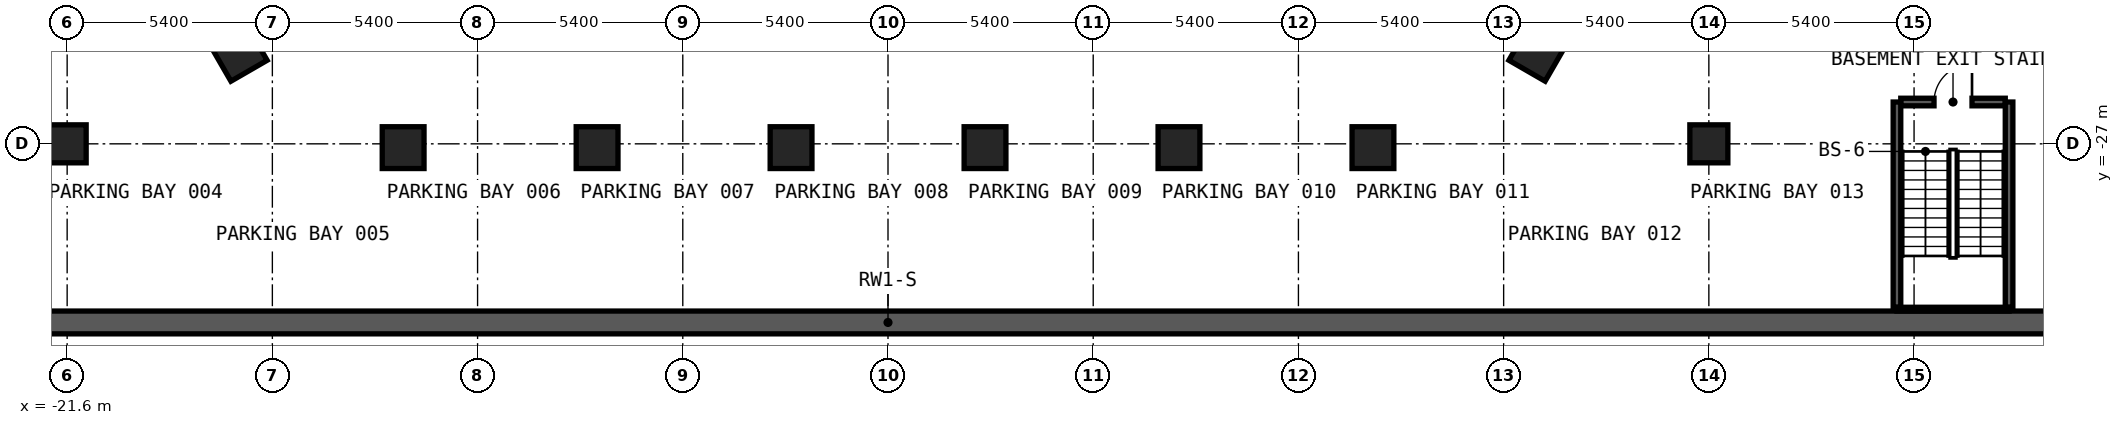
"""IFC4 building model, lengths in metres.
Left out: names, types, materials, properties, quantities, classifications, styles, units other than length and angle.
Written with IfcOpenShell. Run it as: python <this file> out.ifc"""

import sys

from ifc_helpers import new_model, si_unit, direction, frame, frame_2d, origin, origin_2d, place, context, subcontext, project, spatial, rectangle, extrude, element, fill, save


model = new_model("IFC4")
c1 = context("Model", 3, precision=1e-05, world=origin(), true_north=direction((0.0, 1.0)))
c2 = subcontext(c1, "Body", "Model", "MODEL_VIEW")
j1 = project(units=[si_unit("LENGTHUNIT", "METRE"), si_unit("PLANEANGLEUNIT", "RADIAN")], contexts=[c1])
p1 = place(None, origin())
s1 = spatial("IfcSite", under=j1, at=p1, CompositionType="ELEMENT")
p2 = place(p1, origin())
s2 = spatial("IfcBuilding", under=s1, at=p2, CompositionType="ELEMENT")
p3 = place(p2, frame((0.0, 0.0, -8.4)))
s3 = spatial("IfcBuildingStorey", under=s2, at=p3, CompositionType="ELEMENT", Elevation=-8.4)
p4 = place(p3, frame((-48.0, -31.7, -0.35), z_axis=(0.0, 0.0, 1.0), x_axis=(1.0, 0.0, 0.0)))
e1 = element("IfcWall", 1, at=p4, inside=s3, PredefinedType="SOLIDWALL", context=c2, shape_type="SweptSolid", body=[
    extrude(rectangle(XDim=96.0, YDim=0.6, at=frame_2d((48.0, 0.0))), origin(), (0.0, 0.0, 1.0), 4.55),
])
for number, where, z_axis, x_axis in (
    (2, (-17.089, -24.601, -0.35), (0.0, 0.0, 1.0), (0.5, -0.866, 0.0)),
    (3, (-12.759, -27.1, -0.35), (0.0, 0.0, 1.0), (1.0, 0.0, 0.0)),
    (4, (-7.655, -27.1, -0.35), (0.0, 0.0, 1.0), (1.0, 0.0, 0.0)),
    (5, (-2.551, -27.1, -0.35), (0.0, 0.0, 1.0), (1.0, 0.0, 0.0)),
    (6, (2.553, -27.1, -0.35), (0.0, 0.0, 1.0), (1.0, 0.0, 0.0)),
    (7, (7.657, -27.1, -0.35), (0.0, 0.0, 1.0), (1.0, 0.0, 0.0)),
    (8, (12.761, -27.1, -0.35), (0.0, 0.0, 1.0), (1.0, 0.0, 0.0)),
    (9, (17.09, -24.6, -0.35), (0.0, 0.0, 1.0), (0.5, 0.866, 0.0)),
):
    element("IfcColumn", number, at=place(p3, frame(where, z_axis=z_axis, x_axis=x_axis)), inside=s3, PredefinedType="COLUMN", context=c2, shape_type="SweptSolid", body=[
        extrude(rectangle(XDim=1.1, YDim=1.1, at=origin_2d()), origin(), (0.0, 0.0, 1.0), 4.55),
    ])
for number, where, z_axis, x_axis in (
    (10, (-21.6, -27.0, -0.35), (0.0, 0.0, 1.0), (1.0, 0.0, 0.0)),
    (11, (21.6, -27.0, -0.35), (0.0, 0.0, 1.0), (1.0, 0.0, 0.0)),
):
    element("IfcColumn", number, at=place(p3, frame(where, z_axis=z_axis, x_axis=x_axis)), inside=s3, PredefinedType="COLUMN", context=c2, shape_type="SweptSolid", body=[
        extrude(rectangle(XDim=1.0, YDim=1.0, at=origin_2d()), origin(), (0.0, 0.0, 1.0), 4.55),
    ])
p5 = place(p3, frame((26.65, -25.9, 0.0), z_axis=(0.0, 0.0, 1.0), x_axis=(1.0, 0.0, 0.0)))
e12 = element("IfcWall", 12, at=p5, inside=s3, PredefinedType="SOLIDWALL", context=c2, shape_type="SweptSolid", body=[
    extrude(rectangle(XDim=2.75, YDim=0.2, at=frame_2d((1.375, 0.0))), origin(), (0.0, 0.0, 1.0), 3.85),
])
p6 = place(p5, frame((1.875, 0.0, 0.0), z_axis=(0.0, 0.0, 1.0), x_axis=(-1.0, 0.0, 0.0)))
e13 = element("IfcOpeningElement", 13, at=p6, cuts=e12, PredefinedType="OPENING", context=c2, shape_type="SweptSolid", body=[
    extrude(rectangle(XDim=1.0, YDim=2.1, at=frame_2d((0.5, 1.05))), frame((0.0, 0.11, 0.0), z_axis=(0.0, -1.0, 0.0), x_axis=(1.0, 0.0, 0.0)), (0.0, 0.0, 1.0), 0.22),
])
for number, where, z_axis, x_axis in (
    (14, (26.55, -31.3, 0.0), (0.0, 0.0, 1.0), (0.0, 1.0, 0.0)),
    (15, (29.5, -31.3, 0.0), (0.0, 0.0, 1.0), (0.0, 1.0, 0.0)),
):
    element("IfcWall", number, at=place(p3, frame(where, z_axis=z_axis, x_axis=x_axis)), inside=s3, PredefinedType="SOLIDWALL", context=c2, shape_type="SweptSolid", body=[
        extrude(rectangle(XDim=5.4, YDim=0.2, at=frame_2d((2.7, 0.0))), origin(), (0.0, 0.0, 1.0), 3.85),
    ])
p7 = place(p3, frame((26.55, -31.35, 0.0), z_axis=(0.0, 0.0, 1.0), x_axis=(1.0, 0.0, 0.0)))
e16 = element("IfcWall", 16, at=p7, inside=s3, PredefinedType="SOLIDWALL", context=c2, shape_type="SweptSolid", body=[
    extrude(rectangle(XDim=2.95, YDim=0.1, at=frame_2d((1.475, 0.0))), origin(), (0.0, 0.0, 1.0), 3.85),
])
p8 = place(p6, origin())
e17 = element("IfcDoor", 17, at=p8, inside=s3, OperationType="SINGLE_SWING_LEFT", PredefinedType="DOOR", context=c2, shape_type="SweptSolid", body=[
    extrude(rectangle(XDim=1.0, YDim=2.1, at=frame_2d((0.5, 1.05))), frame((0.0, 0.025, 0.0), z_axis=(0.0, -1.0, 0.0), x_axis=(1.0, 0.0, 0.0)), (0.0, 0.0, 1.0), 0.05),
])
fill(e13, e17)
save(model, sys.argv[1])
